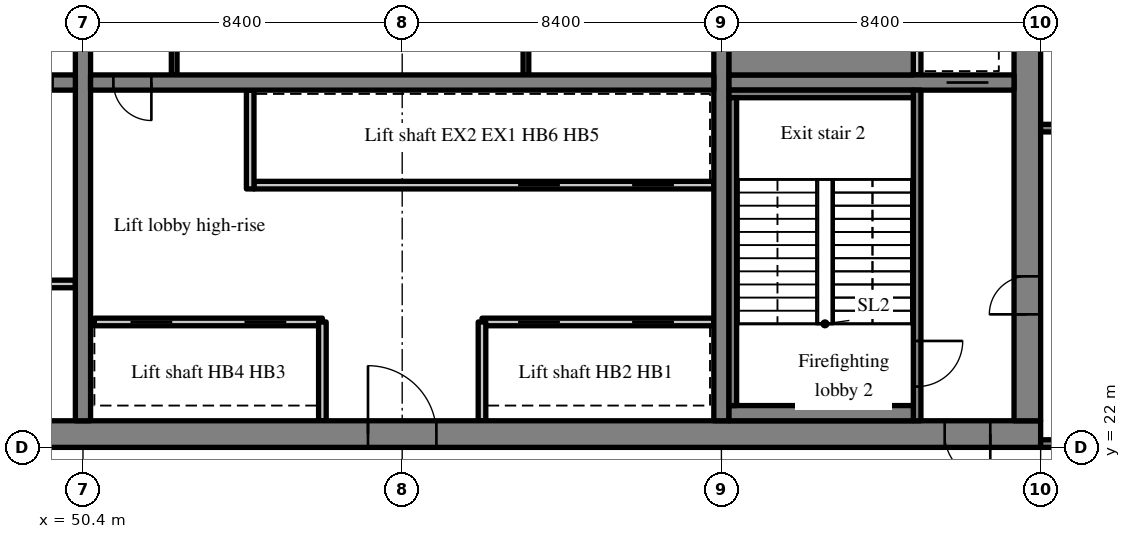
"""IFC4 building model, lengths in metres.
Left out: names, types, materials, properties, quantities, classifications, styles, units other than length and angle.
Written with IfcOpenShell. Run it as: python <this file> out.ifc"""

import sys

from ifc_helpers import new_model, si_unit, direction, frame, frame_2d, origin, place, context, subcontext, project, spatial, rectangle, extrude, source, transform, mapped, element, fill, save


model = new_model("IFC4")
c1 = context("Model", 3, precision=1e-05, world=origin(), true_north=direction((0.0, 1.0)))
c2 = subcontext(c1, "Body", "Model", "MODEL_VIEW")
j1 = project(units=[si_unit("LENGTHUNIT", "METRE"), si_unit("PLANEANGLEUNIT", "RADIAN")], contexts=[c1])
p1 = place(None, origin())
s1 = spatial("IfcSite", under=j1, at=p1, CompositionType="ELEMENT")
p2 = place(p1, origin())
s2 = spatial("IfcBuilding", under=s1, at=p2, CompositionType="ELEMENT")
p3 = place(p2, frame((0.0, 0.0, 185.8)))
s3 = spatial("IfcBuildingStorey", under=s2, at=p3, CompositionType="ELEMENT", Elevation=185.8)
m1 = source(origin(), c2, "Body", "SweptSolid", [
    extrude(rectangle(XDim=50.4, YDim=0.7, at=frame_2d((25.2, 0.0))), origin(), (0.0, 0.0, 1.0), 3.52),
])
p4 = place(p3, frame((25.2, 22.35, 0.0), z_axis=(0.0, 0.0, 1.0), x_axis=(1.0, 0.0, 0.0)))
e1 = element("IfcWall", 1, at=p4, inside=s3, PredefinedType="SHEAR", context=c2, shape_type="MappedRepresentation", body=[
    mapped(m1, transform((0.0, 0.0, 0.0), scale=1.0)),
])
m2 = source(origin(), c2, "Body", "SweptSolid", [
    extrude(rectangle(XDim=1.8, YDim=2.1, at=frame_2d((0.9, 1.05))), frame((0.0, 0.36, 0.0), z_axis=(0.0, -1.0, 0.0), x_axis=(1.0, 0.0, 0.0)), (0.0, 0.0, 1.0), 0.72),
])
p5 = place(p4, frame((15.9, 0.0, 0.0)))
e2 = element("IfcOpeningElement", 2, at=p5, cuts=e1, PredefinedType="OPENING", context=c2, shape_type="MappedRepresentation", body=[
    mapped(m2, transform((0.0, 0.0, 0.0), scale=1.0)),
])
m3 = source(origin(), c2, "Body", "SweptSolid", [
    extrude(rectangle(XDim=0.9, YDim=2.1, at=frame_2d((0.45, 1.05))), frame((0.0, 0.36, 0.0), z_axis=(0.0, -1.0, 0.0), x_axis=(1.0, 0.0, 0.0)), (0.0, 0.0, 1.0), 0.72),
])
p6 = place(p4, frame((9.7, 0.0, 0.0)))
e3 = element("IfcOpeningElement", 3, at=p6, cuts=e1, PredefinedType="OPENING", context=c2, shape_type="MappedRepresentation", body=[
    mapped(m3, transform((0.0, 0.0, 0.0), scale=1.0)),
])
p7 = place(p4, frame((21.5, 0.0, 0.0)))
e4 = element("IfcOpeningElement", 4, at=p7, cuts=e1, PredefinedType="OPENING", context=c2, shape_type="MappedRepresentation", body=[
    mapped(m3, transform((0.0, 0.0, 0.0), scale=1.0)),
])
p8 = place(p4, frame((32.7, 0.0, 0.0)))
e5 = element("IfcOpeningElement", 5, at=p8, cuts=e1, PredefinedType="OPENING", context=c2, shape_type="MappedRepresentation", body=[
    mapped(m2, transform((0.0, 0.0, 0.0), scale=1.0)),
])
m4 = source(origin(), c2, "Body", "SweptSolid", [
    extrude(rectangle(XDim=1.2, YDim=2.1, at=frame_2d((0.6, 1.05))), frame((0.0, 0.36, 0.0), z_axis=(0.0, -1.0, 0.0), x_axis=(1.0, 0.0, 0.0)), (0.0, 0.0, 1.0), 0.72),
])
p9 = place(p4, frame((6.475, 0.0, 0.0)))
e6 = element("IfcOpeningElement", 6, at=p9, cuts=e1, PredefinedType="OPENING", context=c2, shape_type="MappedRepresentation", body=[
    mapped(m4, transform((0.0, 0.0, 0.0), scale=1.0)),
])
p10 = place(p4, frame((47.875, 0.0, 0.0)))
e7 = element("IfcOpeningElement", 7, at=p10, cuts=e1, PredefinedType="OPENING", context=c2, shape_type="MappedRepresentation", body=[
    mapped(m4, transform((0.0, 0.0, 0.0), scale=1.0)),
])
m5 = source(origin(), c2, "Body", "SweptSolid", [
    extrude(rectangle(XDim=18.6, YDim=0.7, at=frame_2d((9.3, 0.0))), origin(), (0.0, 0.0, 1.0), 3.52),
])
p11 = place(p3, frame((75.25, 22.7, 0.0), z_axis=(0.0, 0.0, 1.0), x_axis=(0.0, 1.0, 0.0)))
e8 = element("IfcWall", 8, at=p11, inside=s3, PredefinedType="SHEAR", context=c2, shape_type="MappedRepresentation", body=[
    mapped(m5, transform((0.0, 0.0, 0.0), scale=1.0)),
])
m6 = source(origin(), c2, "Body", "SweptSolid", [
    extrude(rectangle(XDim=1.0, YDim=2.1, at=frame_2d((0.5, 1.05))), frame((0.0, 0.36, 0.0), z_axis=(0.0, -1.0, 0.0), x_axis=(1.0, 0.0, 0.0)), (0.0, 0.0, 1.0), 0.72),
])
p12 = place(p11, frame((2.8, 0.0, 0.0)))
e9 = element("IfcOpeningElement", 9, at=p12, cuts=e8, PredefinedType="OPENING", context=c2, shape_type="MappedRepresentation", body=[
    mapped(m6, transform((0.0, 0.0, 0.0), scale=1.0)),
])
p13 = place(p11, frame((12.7, 0.0, 0.0)))
e10 = element("IfcOpeningElement", 10, at=p13, cuts=e8, PredefinedType="OPENING", context=c2, shape_type="MappedRepresentation", body=[
    mapped(m4, transform((0.0, 0.0, 0.0), scale=1.0)),
])
m7 = source(origin(), c2, "Body", "SweptSolid", [
    extrude(rectangle(XDim=18.6, YDim=0.4, at=frame_2d((9.3, 0.0))), origin(), (0.0, 0.0, 1.0), 3.52),
])
p14 = place(p3, frame((50.4, 22.7, 0.0), z_axis=(0.0, 0.0, 1.0), x_axis=(0.0, 1.0, 0.0)))
e11 = element("IfcWall", 11, at=p14, inside=s3, PredefinedType="SHEAR", context=c2, shape_type="MappedRepresentation", body=[
    mapped(m7, transform((0.0, 0.0, 0.0), scale=1.0)),
])
m8 = source(origin(), c2, "Body", "SweptSolid", [
    extrude(rectangle(XDim=1.1, YDim=2.1, at=frame_2d((0.55, 1.05))), frame((0.0, 0.21, 0.0), z_axis=(0.0, -1.0, 0.0), x_axis=(1.0, 0.0, 0.0)), (0.0, 0.0, 1.0), 0.42),
])
p15 = place(p14, frame((12.75, 0.0, 0.0)))
e12 = element("IfcOpeningElement", 12, at=p15, cuts=e11, PredefinedType="OPENING", context=c2, shape_type="MappedRepresentation", body=[
    mapped(m8, transform((0.0, 0.0, 0.0), scale=1.0)),
])
p16 = place(p3, frame((67.2, 22.7, 0.0), z_axis=(0.0, 0.0, 1.0), x_axis=(0.0, 1.0, 0.0)))
e13 = element("IfcWall", 13, at=p16, inside=s3, PredefinedType="SHEAR", context=c2, shape_type="MappedRepresentation", body=[
    mapped(m7, transform((0.0, 0.0, 0.0), scale=1.0)),
])
m9 = source(origin(), c2, "Body", "SweptSolid", [
    extrude(rectangle(XDim=16.4, YDim=0.4, at=frame_2d((8.2, 0.0))), origin(), (0.0, 0.0, 1.0), 3.52),
])
p17 = place(p3, frame((33.8, 31.6, 0.0), z_axis=(0.0, 0.0, 1.0), x_axis=(1.0, 0.0, 0.0)))
e14 = element("IfcWall", 14, at=p17, inside=s3, PredefinedType="SHEAR", context=c2, shape_type="MappedRepresentation", body=[
    mapped(m9, transform((0.0, 0.0, 0.0), scale=1.0)),
])
m10 = source(origin(), c2, "Body", "SweptSolid", [
    extrude(rectangle(XDim=1.0, YDim=2.1, at=frame_2d((0.5, 1.05))), frame((0.0, 0.21, 0.0), z_axis=(0.0, -1.0, 0.0), x_axis=(1.0, 0.0, 0.0)), (0.0, 0.0, 1.0), 0.42),
])
p18 = place(p17, frame((14.8, 0.0, 0.0)))
e15 = element("IfcOpeningElement", 15, at=p18, cuts=e14, PredefinedType="OPENING", context=c2, shape_type="MappedRepresentation", body=[
    mapped(m10, transform((0.0, 0.0, 0.0), scale=1.0)),
])
p19 = place(p3, frame((50.6, 31.6, 0.0), z_axis=(0.0, 0.0, 1.0), x_axis=(1.0, 0.0, 0.0)))
e16 = element("IfcWall", 16, at=p19, inside=s3, PredefinedType="SHEAR", context=c2, shape_type="MappedRepresentation", body=[
    mapped(m9, transform((0.0, 0.0, 0.0), scale=1.0)),
])
p20 = place(p19, frame((0.6, 0.0, 0.0)))
e17 = element("IfcOpeningElement", 17, at=p20, cuts=e16, PredefinedType="OPENING", context=c2, shape_type="MappedRepresentation", body=[
    mapped(m10, transform((0.0, 0.0, 0.0), scale=1.0)),
])
m11 = source(origin(), c2, "Body", "SweptSolid", [
    extrude(rectangle(XDim=7.5, YDim=0.4, at=frame_2d((3.75, 0.0))), origin(), (0.0, 0.0, 1.0), 3.52),
])
p21 = place(p3, frame((67.4, 31.6, 0.0), z_axis=(0.0, 0.0, 1.0), x_axis=(1.0, 0.0, 0.0)))
e18 = element("IfcWall", 18, at=p21, inside=s3, PredefinedType="SHEAR", context=c2, shape_type="MappedRepresentation", body=[
    mapped(m11, transform((0.0, 0.0, 0.0), scale=1.0)),
])
p22 = place(p21, frame((5.725, 0.0, 0.0)))
e19 = element("IfcOpeningElement", 19, at=p22, cuts=e18, PredefinedType="OPENING", context=c2, shape_type="MappedRepresentation", body=[
    mapped(m8, transform((0.0, 0.0, 0.0), scale=1.0)),
])
m12 = source(origin(), c2, "Body", "SweptSolid", [
    extrude(rectangle(XDim=6.1, YDim=0.2, at=frame_2d((3.05, 0.0))), origin(), (0.0, 0.0, 1.0), 3.52),
])
p23 = place(p3, frame((44.1, 26.3, 0.0), z_axis=(0.0, 0.0, 1.0), x_axis=(1.0, 0.0, 0.0)))
e20 = element("IfcWall", 20, at=p23, inside=s3, PredefinedType="PARTITIONING", context=c2, shape_type="MappedRepresentation", body=[
    mapped(m12, transform((0.0, 0.0, 0.0), scale=1.0)),
])
m13 = source(origin(), c2, "Body", "SweptSolid", [
    extrude(rectangle(XDim=6.1, YDim=0.2, at=frame_2d((3.05, 0.0))), origin(), (0.0, 0.0, 1.0), 3.52),
])
p24 = place(p3, frame((67.0, 25.3, 0.0), z_axis=(0.0, 0.0, 1.0), x_axis=(-1.0, 0.0, 0.0)))
e21 = element("IfcWall", 21, at=p24, inside=s3, PredefinedType="SOLIDWALL", context=c2, shape_type="MappedRepresentation", body=[
    mapped(m13, transform((0.0, 0.0, 0.0), scale=1.0)),
])
m14 = source(origin(), c2, "Body", "SweptSolid", [
    extrude(rectangle(XDim=1.1, YDim=2.1, at=frame_2d((0.55, 1.05))), frame((0.0, 0.11, 0.0), z_axis=(0.0, -1.0, 0.0), x_axis=(1.0, 0.0, 0.0)), (0.0, 0.0, 1.0), 0.22),
])
p25 = place(p24, frame((1.05, 0.0, 0.0)))
e22 = element("IfcOpeningElement", 22, at=p25, cuts=e21, PredefinedType="OPENING", context=c2, shape_type="MappedRepresentation", body=[
    mapped(m14, transform((0.0, 0.0, 0.0), scale=1.0)),
])
p26 = place(p24, frame((4.05, 0.0, 0.0)))
e23 = element("IfcOpeningElement", 23, at=p26, cuts=e21, PredefinedType="OPENING", context=c2, shape_type="MappedRepresentation", body=[
    mapped(m14, transform((0.0, 0.0, 0.0), scale=1.0)),
])
m15 = source(origin(), c2, "Body", "SweptSolid", [
    extrude(rectangle(XDim=6.0, YDim=0.2, at=frame_2d((3.0, 0.0))), origin(), (0.0, 0.0, 1.0), 3.52),
])
p27 = place(p3, frame((56.7, 25.3, 0.0), z_axis=(0.0, 0.0, 1.0), x_axis=(-1.0, 0.0, 0.0)))
e24 = element("IfcWall", 24, at=p27, inside=s3, PredefinedType="SOLIDWALL", context=c2, shape_type="MappedRepresentation", body=[
    mapped(m15, transform((0.0, 0.0, 0.0), scale=1.0)),
])
p28 = place(p27, frame((0.95, 0.0, 0.0)))
e25 = element("IfcOpeningElement", 25, at=p28, cuts=e24, PredefinedType="OPENING", context=c2, shape_type="MappedRepresentation", body=[
    mapped(m14, transform((0.0, 0.0, 0.0), scale=1.0)),
])
p29 = place(p27, frame((3.95, 0.0, 0.0)))
e26 = element("IfcOpeningElement", 26, at=p29, cuts=e24, PredefinedType="OPENING", context=c2, shape_type="MappedRepresentation", body=[
    mapped(m14, transform((0.0, 0.0, 0.0), scale=1.0)),
])
m16 = source(origin(), c2, "Body", "SweptSolid", [
    extrude(rectangle(XDim=12.1, YDim=0.2, at=frame_2d((6.05, 0.0))), origin(), (0.0, 0.0, 1.0), 3.52),
])
p30 = place(p3, frame((67.0, 28.9, 0.0), z_axis=(0.0, 0.0, 1.0), x_axis=(-1.0, 0.0, 0.0)))
e27 = element("IfcWall", 27, at=p30, inside=s3, PredefinedType="SOLIDWALL", context=c2, shape_type="MappedRepresentation", body=[
    mapped(m16, transform((0.0, 0.0, 0.0), scale=1.0)),
])
p31 = place(p30, frame((1.05, 0.0, 0.0)))
e28 = element("IfcOpeningElement", 28, at=p31, cuts=e27, PredefinedType="OPENING", context=c2, shape_type="MappedRepresentation", body=[
    mapped(m14, transform((0.0, 0.0, 0.0), scale=1.0)),
])
p32 = place(p30, frame((4.05, 0.0, 0.0)))
e29 = element("IfcOpeningElement", 29, at=p32, cuts=e27, PredefinedType="OPENING", context=c2, shape_type="MappedRepresentation", body=[
    mapped(m14, transform((0.0, 0.0, 0.0), scale=1.0)),
])
m17 = source(origin(), c2, "Body", "SweptSolid", [
    extrude(rectangle(XDim=2.6, YDim=0.2, at=frame_2d((1.3, 0.0))), origin(), (0.0, 0.0, 1.0), 3.52),
])
for number, where, z_axis, x_axis in (
    (30, (60.9, 22.7, 0.0), (0.0, 0.0, 1.0), (0.0, 1.0, 0.0)),
    (31, (56.7, 22.7, 0.0), (0.0, 0.0, 1.0), (0.0, 1.0, 0.0)),
):
    element("IfcWall", number, at=place(p3, frame(where, z_axis=z_axis, x_axis=x_axis)), inside=s3, PredefinedType="SOLIDWALL", context=c2, shape_type="MappedRepresentation", body=[
        mapped(m17, transform((0.0, 0.0, 0.0), scale=1.0)),
    ])
m18 = source(origin(), c2, "Body", "SweptSolid", [
    extrude(rectangle(XDim=2.6, YDim=0.2, at=frame_2d((1.3, 0.0))), origin(), (0.0, 0.0, 1.0), 3.52),
])
p33 = place(p3, frame((54.8, 28.8, 0.0), z_axis=(0.0, 0.0, 1.0), x_axis=(0.0, 1.0, 0.0)))
e32 = element("IfcWall", 32, at=p33, inside=s3, PredefinedType="SOLIDWALL", context=c2, shape_type="MappedRepresentation", body=[
    mapped(m18, transform((0.0, 0.0, 0.0), scale=1.0)),
])
m19 = source(origin(), c2, "Body", "SweptSolid", [
    extrude(rectangle(XDim=3.2, YDim=0.15, at=frame_2d((1.6, 0.0))), origin(), (0.0, 0.0, 1.0), 3.52),
])
for number, where, z_axis, x_axis in (
    (33, (52.8, 31.8, 0.0), (0.0, 0.0, 1.0), (0.0, 1.0, 0.0)),
    (34, (62.056, 31.8, 0.0), (0.0, 0.0, 1.0), (0.0, 1.0, 0.0)),
):
    element("IfcWall", number, at=place(p3, frame(where, z_axis=z_axis, x_axis=x_axis)), inside=s3, PredefinedType="PARTITIONING", context=c2, shape_type="MappedRepresentation", body=[
        mapped(m19, transform((0.0, 0.0, 0.0), scale=1.0)),
    ])
m20 = source(origin(), c2, "Body", "SweptSolid", [
    extrude(rectangle(XDim=8.7, YDim=0.2, at=frame_2d((4.35, 0.0))), origin(), (0.0, 0.0, 1.0), 3.52),
])
p34 = place(p3, frame((72.35, 22.7, 0.0), z_axis=(0.0, 0.0, 1.0), x_axis=(0.0, 1.0, 0.0)))
e35 = element("IfcWall", 35, at=p34, inside=s3, PredefinedType="SOLIDWALL", context=c2, shape_type="MappedRepresentation", body=[
    mapped(m20, transform((0.0, 0.0, 0.0), scale=1.0)),
])
m21 = source(origin(), c2, "Body", "SweptSolid", [
    extrude(rectangle(XDim=1.2, YDim=2.1, at=frame_2d((0.6, 1.05))), frame((0.0, 0.11, 0.0), z_axis=(0.0, -1.0, 0.0), x_axis=(1.0, 0.0, 0.0)), (0.0, 0.0, 1.0), 0.22),
])
p35 = place(p34, frame((0.9, 0.0, 0.0)))
e36 = element("IfcOpeningElement", 36, at=p35, cuts=e35, PredefinedType="OPENING", context=c2, shape_type="MappedRepresentation", body=[
    mapped(m21, transform((0.0, 0.0, 0.0), scale=1.0)),
])
m22 = source(origin(), c2, "Body", "SweptSolid", [
    extrude(rectangle(XDim=1.8, YDim=0.2, at=frame_2d((0.9, 0.0))), origin(), (0.0, 0.0, 1.0), 3.52),
])
p36 = place(p3, frame((72.35, 31.8, 0.0), z_axis=(0.0, 0.0, 1.0), x_axis=(0.0, 1.0, 0.0)))
e37 = element("IfcWall", 37, at=p36, inside=s3, PredefinedType="SOLIDWALL", context=c2, shape_type="MappedRepresentation", body=[
    mapped(m22, transform((0.0, 0.0, 0.0), scale=1.0)),
])
m23 = source(origin(), c2, "Body", "SweptSolid", [
    extrude(rectangle(XDim=8.25, YDim=0.2, at=frame_2d((4.125, 0.0))), origin(), (0.0, 0.0, 1.0), 3.52),
])
p37 = place(p3, frame((83.85, 22.1, 0.0), z_axis=(0.0, 0.0, 1.0), x_axis=(-1.0, 0.0, 0.0)))
e38 = element("IfcWall", 38, at=p37, inside=s3, PredefinedType="SOLIDWALL", context=c2, shape_type="MappedRepresentation", body=[
    mapped(m23, transform((0.0, 0.0, 0.0), scale=1.0)),
])
p38 = place(p37, frame((6.05, 0.0, 0.0)))
e39 = element("IfcOpeningElement", 39, at=p38, cuts=e38, PredefinedType="OPENING", context=c2, shape_type="MappedRepresentation", body=[
    mapped(m21, transform((0.0, 0.0, 0.0), scale=1.0)),
])
p39 = place(p3, frame((83.85, 30.4, 0.0), z_axis=(0.0, 0.0, 1.0), x_axis=(-1.0, 0.0, 0.0)))
e40 = element("IfcWall", 40, at=p39, inside=s3, PredefinedType="SOLIDWALL", context=c2, shape_type="MappedRepresentation", body=[
    mapped(m23, transform((0.0, 0.0, 0.0), scale=1.0)),
])
m24 = source(origin(), c2, "Body", "SweptSolid", [
    extrude(rectangle(XDim=1.0, YDim=2.1, at=frame_2d((0.5, 1.05))), frame((0.0, 0.11, 0.0), z_axis=(0.0, -1.0, 0.0), x_axis=(1.0, 0.0, 0.0)), (0.0, 0.0, 1.0), 0.22),
])
p40 = place(p39, frame((6.15, 0.0, 0.0)))
e41 = element("IfcOpeningElement", 41, at=p40, cuts=e40, PredefinedType="OPENING", context=c2, shape_type="MappedRepresentation", body=[
    mapped(m24, transform((0.0, 0.0, 0.0), scale=1.0)),
])
m25 = source(origin(), c2, "Body", "SweptSolid", [
    extrude(rectangle(XDim=4.85, YDim=0.4, at=frame_2d((2.425, 0.0))), origin(), (0.0, 0.0, 1.0), 3.52),
])
p41 = place(p3, frame((67.4, 22.9, 0.0), z_axis=(0.0, 0.0, 1.0), x_axis=(1.0, 0.0, 0.0)))
e42 = element("IfcWall", 42, at=p41, inside=s3, PredefinedType="SOLIDWALL", context=c2, shape_type="MappedRepresentation", body=[
    mapped(m25, transform((0.0, 0.0, 0.0), scale=1.0)),
])
m26 = source(origin(), c2, "Body", "SweptSolid", [
    extrude(rectangle(XDim=4.85, YDim=0.2, at=frame_2d((2.425, 0.0))), origin(), (0.0, 0.0, 1.0), 3.52),
])
p42 = place(p3, frame((67.4, 31.3, 0.0), z_axis=(0.0, 0.0, 1.0), x_axis=(1.0, 0.0, 0.0)))
e43 = element("IfcWall", 43, at=p42, inside=s3, PredefinedType="SOLIDWALL", context=c2, shape_type="MappedRepresentation", body=[
    mapped(m26, transform((0.0, 0.0, 0.0), scale=1.0)),
])
m27 = source(origin(), c2, "Body", "SweptSolid", [
    extrude(rectangle(XDim=8.1, YDim=0.2, at=frame_2d((4.05, 0.0))), origin(), (0.0, 0.0, 1.0), 3.52),
])
p43 = place(p3, frame((67.5, 23.1, 0.0), z_axis=(0.0, 0.0, 1.0), x_axis=(0.0, 1.0, 0.0)))
e44 = element("IfcWall", 44, at=p43, inside=s3, PredefinedType="SOLIDWALL", context=c2, shape_type="MappedRepresentation", body=[
    mapped(m27, transform((0.0, 0.0, 0.0), scale=1.0)),
])
m28 = source(origin(), c2, "Body", "SweptSolid", [
    extrude(rectangle(XDim=4.85, YDim=1.0, at=frame_2d((2.425, 0.0))), origin(), (0.0, 0.0, 1.0), 3.52),
])
p44 = place(p3, frame((67.4, 32.3, 0.0), z_axis=(0.0, 0.0, 1.0), x_axis=(1.0, 0.0, 0.0)))
e45 = element("IfcWall", 45, at=p44, inside=s3, PredefinedType="SOLIDWALL", context=c2, shape_type="MappedRepresentation", body=[
    mapped(m28, transform((0.0, 0.0, 0.0), scale=1.0)),
])
m29 = source(origin(), c2, "Body", "SweptSolid", [
    extrude(rectangle(XDim=1.8, YDim=2.1, at=frame_2d((0.9, 1.05))), frame((0.0, 0.275, 0.0), z_axis=(0.0, -1.0, 0.0), x_axis=(1.0, 0.0, 0.0)), (0.0, 0.0, 1.0), 0.05),
])
p45 = place(p8, origin())
e46 = element("IfcDoor", 46, at=p45, inside=s3, OperationType="DOUBLE_DOOR_SINGLE_SWING", PredefinedType="DOOR", context=c2, shape_type="MappedRepresentation", body=[
    mapped(m29, transform((0.0, 0.0, 0.0), scale=1.0)),
])
fill(e5, e46)
m30 = source(origin(), c2, "Body", "SweptSolid", [
    extrude(rectangle(XDim=1.0, YDim=2.1, at=frame_2d((0.5, 1.05))), frame((0.0, 0.025, 0.0), z_axis=(0.0, -1.0, 0.0), x_axis=(1.0, 0.0, 0.0)), (0.0, 0.0, 1.0), 0.05),
])
p46 = place(p20, origin())
e47 = element("IfcDoor", 47, at=p46, inside=s3, OperationType="SINGLE_SWING_RIGHT", PredefinedType="DOOR", context=c2, shape_type="MappedRepresentation", body=[
    mapped(m30, transform((0.0, 0.0, 0.0), scale=1.0)),
])
fill(e17, e47)
m31 = source(origin(), c2, "Body", "SweptSolid", [
    extrude(rectangle(XDim=1.1, YDim=2.1, at=frame_2d((0.55, 1.05))), frame((0.0, 0.025, 0.0), z_axis=(0.0, -1.0, 0.0), x_axis=(1.0, 0.0, 0.0)), (0.0, 0.0, 1.0), 0.05),
])
p47 = place(p25, origin())
e48 = element("IfcDoor", 48, at=p47, inside=s3, OperationType="SLIDING_TO_RIGHT", PredefinedType="DOOR", context=c2, shape_type="MappedRepresentation", body=[
    mapped(m31, transform((0.0, 0.0, 0.0), scale=1.0)),
])
fill(e22, e48)
p48 = place(p26, origin())
e49 = element("IfcDoor", 49, at=p48, inside=s3, OperationType="SLIDING_TO_LEFT", PredefinedType="DOOR", context=c2, shape_type="MappedRepresentation", body=[
    mapped(m31, transform((0.0, 0.0, 0.0), scale=1.0)),
])
fill(e23, e49)
p49 = place(p28, origin())
e50 = element("IfcDoor", 50, at=p49, inside=s3, OperationType="SLIDING_TO_RIGHT", PredefinedType="DOOR", context=c2, shape_type="MappedRepresentation", body=[
    mapped(m31, transform((0.0, 0.0, 0.0), scale=1.0)),
])
fill(e25, e50)
p50 = place(p29, origin())
e51 = element("IfcDoor", 51, at=p50, inside=s3, OperationType="SLIDING_TO_LEFT", PredefinedType="DOOR", context=c2, shape_type="MappedRepresentation", body=[
    mapped(m31, transform((0.0, 0.0, 0.0), scale=1.0)),
])
fill(e26, e51)
p51 = place(p31, origin())
e52 = element("IfcDoor", 52, at=p51, inside=s3, OperationType="SLIDING_TO_RIGHT", PredefinedType="DOOR", context=c2, shape_type="MappedRepresentation", body=[
    mapped(m31, transform((0.0, 0.0, 0.0), scale=1.0)),
])
fill(e28, e52)
p52 = place(p32, origin())
e53 = element("IfcDoor", 53, at=p52, inside=s3, OperationType="SLIDING_TO_LEFT", PredefinedType="DOOR", context=c2, shape_type="MappedRepresentation", body=[
    mapped(m31, transform((0.0, 0.0, 0.0), scale=1.0)),
])
fill(e29, e53)
m32 = source(origin(), c2, "Body", "SweptSolid", [
    extrude(rectangle(XDim=1.2, YDim=2.1, at=frame_2d((0.6, 1.05))), frame((0.0, 0.025, 0.0), z_axis=(0.0, -1.0, 0.0), x_axis=(1.0, 0.0, 0.0)), (0.0, 0.0, 1.0), 0.05),
])
p53 = place(p35, origin())
e54 = element("IfcDoor", 54, at=p53, inside=s3, OperationType="SINGLE_SWING_RIGHT", PredefinedType="DOOR", context=c2, shape_type="MappedRepresentation", body=[
    mapped(m32, transform((0.0, 0.0, 0.0), scale=1.0)),
])
fill(e36, e54)
m33 = source(origin(), c2, "Body", "SweptSolid", [
    extrude(rectangle(XDim=1.2, YDim=2.1, at=frame_2d((0.6, 1.05))), frame((0.0, 0.275, 0.0), z_axis=(0.0, -1.0, 0.0), x_axis=(1.0, 0.0, 0.0)), (0.0, 0.0, 1.0), 0.05),
])
p54 = place(p10, origin())
e55 = element("IfcDoor", 55, at=p54, inside=s3, OperationType="SINGLE_SWING_RIGHT", PredefinedType="DOOR", context=c2, shape_type="MappedRepresentation", body=[
    mapped(m33, transform((0.0, 0.0, 0.0), scale=1.0)),
])
fill(e7, e55)
p55 = place(p22, origin())
e56 = element("IfcDoor", 56, at=p55, inside=s3, OperationType="SLIDING_TO_RIGHT", PredefinedType="DOOR", context=c2, shape_type="MappedRepresentation", body=[
    mapped(m31, transform((0.0, 0.0, 0.0), scale=1.0)),
])
fill(e19, e56)
p56 = place(p12, origin())
e57 = element("IfcDoor", 57, at=p56, inside=s3, OperationType="SINGLE_SWING_LEFT", PredefinedType="DOOR", context=c2, shape_type="MappedRepresentation", body=[
    mapped(m30, transform((0.0, 0.0, 0.0), scale=1.0)),
])
fill(e9, e57)
save(model, sys.argv[1])
